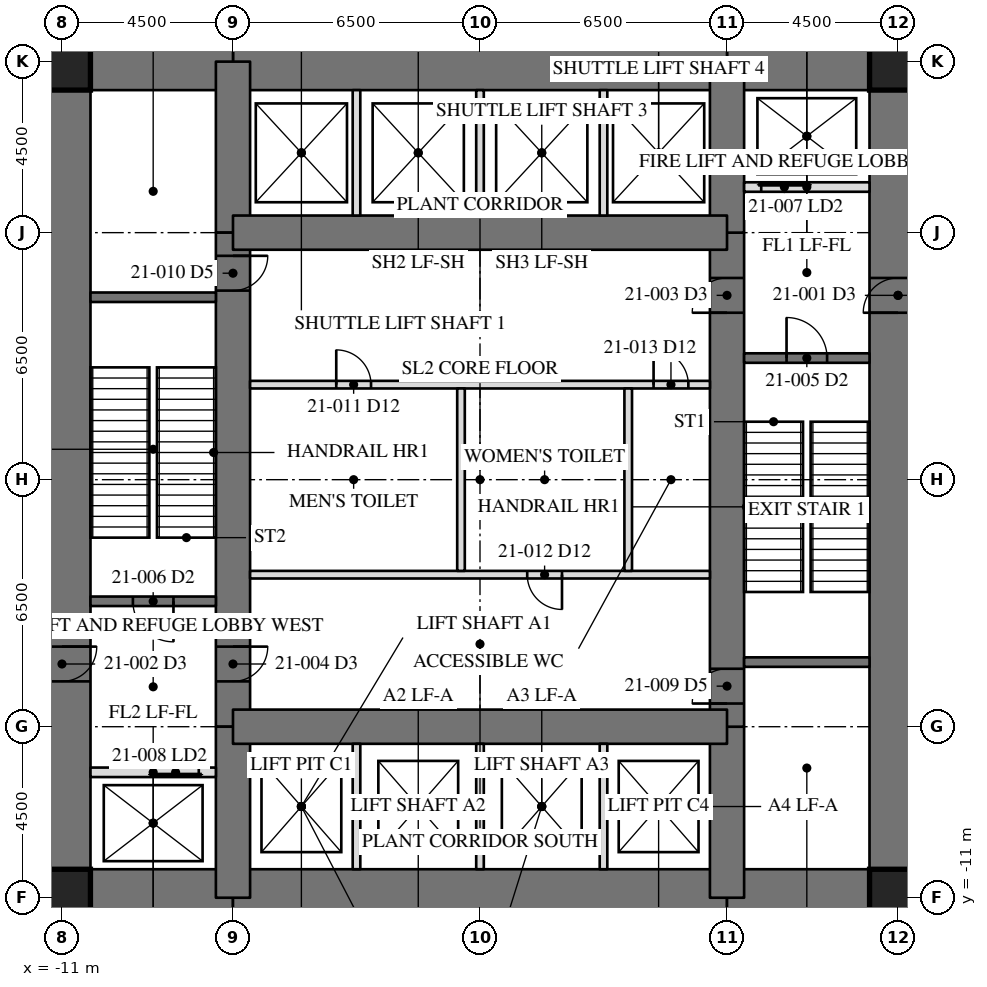
"""IFC4 building model, lengths in metres.
Left out: names, types, materials, properties, quantities, classifications, styles, units other than length and angle.
Written with IfcOpenShell. Run it as: python <this file> out.ifc"""

import sys

from ifc_helpers import new_model, si_unit, direction, frame, frame_2d, origin, origin_2d, place, context, subcontext, project, spatial, rectangle, hollow_rectangle, extrude, element, fill, save


model = new_model("IFC4")
c1 = context("Model", 3, precision=1e-05, world=origin(), true_north=direction((0.0, 1.0)))
c2 = subcontext(c1, "Body", "Model", "MODEL_VIEW")
j1 = project(units=[si_unit("LENGTHUNIT", "METRE"), si_unit("PLANEANGLEUNIT", "RADIAN")], contexts=[c1])
p1 = place(None, origin())
s1 = spatial("IfcSite", under=j1, at=p1, CompositionType="ELEMENT")
p2 = place(p1, origin())
s2 = spatial("IfcBuilding", under=s1, at=p2, CompositionType="ELEMENT")
p3 = place(p2, frame((0.0, 0.0, 89.8)))
s3 = spatial("IfcBuildingStorey", under=s2, at=p3, CompositionType="ELEMENT", Elevation=89.8)
p4 = place(p3, frame((11.0, -11.0, 0.0), z_axis=(0.0, 0.0, 1.0), x_axis=(0.0, 1.0, 0.0)))
e1 = element("IfcWall", 1, at=p4, inside=s3, PredefinedType="SHEAR", context=c2, shape_type="SweptSolid", body=[
    extrude(rectangle(XDim=22.0, YDim=1.5, at=frame_2d((11.0, 0.0))), origin(), (0.0, 0.0, 1.0), 6.0),
])
p5 = place(p4, frame((15.393, 0.0, 0.0)))
e2 = element("IfcOpeningElement", 2, at=p5, cuts=e1, PredefinedType="OPENING", context=c2, shape_type="SweptSolid", body=[
    extrude(rectangle(XDim=0.915, YDim=2.134, at=frame_2d((0.458, 1.067))), frame((0.0, 0.76, 0.0), z_axis=(0.0, -1.0, 0.0), x_axis=(1.0, 0.0, 0.0)), (0.0, 0.0, 1.0), 1.52),
])
p6 = place(p3, frame((-11.0, 11.0, 0.0), z_axis=(0.0, 0.0, 1.0), x_axis=(0.0, -1.0, 0.0)))
e3 = element("IfcWall", 3, at=p6, inside=s3, PredefinedType="SHEAR", context=c2, shape_type="SweptSolid", body=[
    extrude(rectangle(XDim=22.0, YDim=1.5, at=frame_2d((11.0, 0.0))), origin(), (0.0, 0.0, 1.0), 6.0),
])
p7 = place(p6, frame((15.393, 0.0, 0.0)))
e4 = element("IfcOpeningElement", 4, at=p7, cuts=e3, PredefinedType="OPENING", context=c2, shape_type="SweptSolid", body=[
    extrude(rectangle(XDim=0.915, YDim=2.134, at=frame_2d((0.458, 1.067))), frame((0.0, 0.76, 0.0), z_axis=(0.0, -1.0, 0.0), x_axis=(1.0, 0.0, 0.0)), (0.0, 0.0, 1.0), 1.52),
])
p8 = place(p3, frame((11.0, 11.0, 0.0), z_axis=(0.0, 0.0, 1.0), x_axis=(-1.0, 0.0, 0.0)))
e5 = element("IfcWall", 5, at=p8, inside=s3, PredefinedType="SHEAR", context=c2, shape_type="SweptSolid", body=[
    extrude(rectangle(XDim=4.5, YDim=1.5, at=frame_2d((2.25, 0.0))), origin(), (0.0, 0.0, 1.0), 6.0),
])
p9 = place(p3, frame((6.5, 11.0, 0.0), z_axis=(0.0, 0.0, 1.0), x_axis=(-1.0, 0.0, 0.0)))
e6 = element("IfcWall", 6, at=p9, inside=s3, PredefinedType="SHEAR", context=c2, shape_type="SweptSolid", body=[
    extrude(rectangle(XDim=13.0, YDim=1.5, at=frame_2d((6.5, 0.0))), origin(), (0.0, 0.0, 1.0), 6.0),
])
for number, where, z_axis, x_axis in (
    (7, (-6.5, 11.0, 0.0), (0.0, 0.0, 1.0), (-1.0, 0.0, 0.0)),
    (8, (-11.0, -11.0, 0.0), (0.0, 0.0, 1.0), (1.0, 0.0, 0.0)),
):
    element("IfcWall", number, at=place(p3, frame(where, z_axis=z_axis, x_axis=x_axis)), inside=s3, PredefinedType="SHEAR", context=c2, shape_type="SweptSolid", body=[
        extrude(rectangle(XDim=4.5, YDim=1.5, at=frame_2d((2.25, 0.0))), origin(), (0.0, 0.0, 1.0), 6.0),
    ])
p10 = place(p3, frame((-6.5, -11.0, 0.0), z_axis=(0.0, 0.0, 1.0), x_axis=(1.0, 0.0, 0.0)))
e9 = element("IfcWall", 9, at=p10, inside=s3, PredefinedType="SHEAR", context=c2, shape_type="SweptSolid", body=[
    extrude(rectangle(XDim=13.0, YDim=1.5, at=frame_2d((6.5, 0.0))), origin(), (0.0, 0.0, 1.0), 6.0),
])
p11 = place(p3, frame((6.5, -11.0, 0.0), z_axis=(0.0, 0.0, 1.0), x_axis=(1.0, 0.0, 0.0)))
e10 = element("IfcWall", 10, at=p11, inside=s3, PredefinedType="SHEAR", context=c2, shape_type="SweptSolid", body=[
    extrude(rectangle(XDim=4.5, YDim=1.5, at=frame_2d((2.25, 0.0))), origin(), (0.0, 0.0, 1.0), 6.0),
])
p12 = place(p3, frame((6.5, -11.0, 0.0), z_axis=(0.0, 0.0, 1.0), x_axis=(0.0, 1.0, 0.0)))
e11 = element("IfcWall", 11, at=p12, inside=s3, PredefinedType="SHEAR", context=c2, shape_type="SweptSolid", body=[
    extrude(rectangle(XDim=4.5, YDim=0.9, at=frame_2d((2.25, 0.0))), origin(), (0.0, 0.0, 1.0), 6.0),
])
p13 = place(p3, frame((6.5, -6.5, 0.0), z_axis=(0.0, 0.0, 1.0), x_axis=(0.0, 1.0, 0.0)))
e12 = element("IfcWall", 12, at=p13, inside=s3, PredefinedType="SHEAR", context=c2, shape_type="SweptSolid", body=[
    extrude(rectangle(XDim=13.0, YDim=0.9, at=frame_2d((6.5, 0.0))), origin(), (0.0, 0.0, 1.0), 6.0),
])
p14 = place(p13, frame((10.893, 0.0, 0.0)))
e13 = element("IfcOpeningElement", 13, at=p14, cuts=e12, PredefinedType="OPENING", context=c2, shape_type="SweptSolid", body=[
    extrude(rectangle(XDim=0.915, YDim=2.134, at=frame_2d((0.458, 1.067))), frame((0.0, 0.46, 0.0), z_axis=(0.0, -1.0, 0.0), x_axis=(1.0, 0.0, 0.0)), (0.0, 0.0, 1.0), 0.92),
])
p15 = place(p13, frame((0.61, 0.0, 0.0)))
e14 = element("IfcOpeningElement", 14, at=p15, cuts=e12, PredefinedType="OPENING", context=c2, shape_type="SweptSolid", body=[
    extrude(rectangle(XDim=0.915, YDim=2.134, at=frame_2d((0.458, 1.067))), frame((0.0, 0.46, 0.0), z_axis=(0.0, -1.0, 0.0), x_axis=(1.0, 0.0, 0.0)), (0.0, 0.0, 1.0), 0.92),
])
for number, where, z_axis, x_axis in (
    (15, (6.5, 6.5, 0.0), (0.0, 0.0, 1.0), (0.0, 1.0, 0.0)),
    (16, (-6.5, 11.0, 0.0), (0.0, 0.0, 1.0), (0.0, -1.0, 0.0)),
):
    element("IfcWall", number, at=place(p3, frame(where, z_axis=z_axis, x_axis=x_axis)), inside=s3, PredefinedType="SHEAR", context=c2, shape_type="SweptSolid", body=[
        extrude(rectangle(XDim=4.5, YDim=0.9, at=frame_2d((2.25, 0.0))), origin(), (0.0, 0.0, 1.0), 6.0),
    ])
p16 = place(p3, frame((-6.5, 6.5, 0.0), z_axis=(0.0, 0.0, 1.0), x_axis=(0.0, -1.0, 0.0)))
e17 = element("IfcWall", 17, at=p16, inside=s3, PredefinedType="SHEAR", context=c2, shape_type="SweptSolid", body=[
    extrude(rectangle(XDim=13.0, YDim=0.9, at=frame_2d((6.5, 0.0))), origin(), (0.0, 0.0, 1.0), 6.0),
])
p17 = place(p16, frame((10.893, 0.0, 0.0)))
e18 = element("IfcOpeningElement", 18, at=p17, cuts=e17, PredefinedType="OPENING", context=c2, shape_type="SweptSolid", body=[
    extrude(rectangle(XDim=0.915, YDim=2.134, at=frame_2d((0.458, 1.067))), frame((0.0, 0.46, 0.0), z_axis=(0.0, -1.0, 0.0), x_axis=(1.0, 0.0, 0.0)), (0.0, 0.0, 1.0), 0.92),
])
p18 = place(p16, frame((0.61, 0.0, 0.0)))
e19 = element("IfcOpeningElement", 19, at=p18, cuts=e17, PredefinedType="OPENING", context=c2, shape_type="SweptSolid", body=[
    extrude(rectangle(XDim=0.915, YDim=2.134, at=frame_2d((0.458, 1.067))), frame((0.0, 0.46, 0.0), z_axis=(0.0, -1.0, 0.0), x_axis=(1.0, 0.0, 0.0)), (0.0, 0.0, 1.0), 0.92),
])
p19 = place(p3, frame((-6.5, -6.5, 0.0), z_axis=(0.0, 0.0, 1.0), x_axis=(0.0, -1.0, 0.0)))
e20 = element("IfcWall", 20, at=p19, inside=s3, PredefinedType="SHEAR", context=c2, shape_type="SweptSolid", body=[
    extrude(rectangle(XDim=4.5, YDim=0.9, at=frame_2d((2.25, 0.0))), origin(), (0.0, 0.0, 1.0), 6.0),
])
for number, where, z_axis, x_axis in (
    (21, (6.5, 6.5, 0.0), (0.0, 0.0, 1.0), (-1.0, 0.0, 0.0)),
    (22, (-6.5, -6.5, 0.0), (0.0, 0.0, 1.0), (1.0, 0.0, 0.0)),
):
    element("IfcWall", number, at=place(p3, frame(where, z_axis=z_axis, x_axis=x_axis)), inside=s3, PredefinedType="SHEAR", context=c2, shape_type="SweptSolid", body=[
        extrude(rectangle(XDim=13.0, YDim=0.9, at=frame_2d((6.5, 0.0))), origin(), (0.0, 0.0, 1.0), 6.0),
    ])
for number, where, z_axis, x_axis in (
    (23, (11.0, 11.0, 0.0), (0.0, 0.0, 1.0), (1.0, 0.0, 0.0)),
    (24, (-11.0, 11.0, 0.0), (0.0, 0.0, 1.0), (1.0, 0.0, 0.0)),
    (25, (-11.0, -11.0, 0.0), (0.0, 0.0, 1.0), (1.0, 0.0, 0.0)),
    (26, (11.0, -11.0, 0.0), (0.0, 0.0, 1.0), (1.0, 0.0, 0.0)),
):
    element("IfcColumn", number, at=place(p3, frame(where, z_axis=z_axis, x_axis=x_axis)), inside=s3, PredefinedType="COLUMN", context=c2, shape_type="SweptSolid", body=[
        extrude(hollow_rectangle(XDim=1.499, YDim=1.499, WallThickness=0.102, at=origin_2d()), origin(), (0.0, 0.0, 1.0), 6.0),
    ])
for number, where, z_axis, x_axis in (
    (27, (6.95, -4.8, 0.0), (0.0, 0.0, 1.0), (1.0, 0.0, 0.0)),
    (28, (-6.95, 4.8, 0.0), (0.0, 0.0, 1.0), (-1.0, 0.0, 0.0)),
):
    element("IfcWall", number, at=place(p3, frame(where, z_axis=z_axis, x_axis=x_axis)), inside=s3, PredefinedType="SOLIDWALL", context=c2, shape_type="SweptSolid", body=[
        extrude(rectangle(XDim=3.3, YDim=0.25, at=frame_2d((1.65, 0.0))), origin(), (0.0, 0.0, 1.0), 5.81),
    ])
p20 = place(p3, frame((6.95, 3.2, 0.0), z_axis=(0.0, 0.0, 1.0), x_axis=(1.0, 0.0, 0.0)))
e29 = element("IfcWall", 29, at=p20, inside=s3, PredefinedType="SOLIDWALL", context=c2, shape_type="SweptSolid", body=[
    extrude(rectangle(XDim=3.3, YDim=0.25, at=frame_2d((1.65, 0.0))), origin(), (0.0, 0.0, 1.0), 5.81),
])
p21 = place(p20, frame((1.116, 0.0, 0.0)))
e30 = element("IfcOpeningElement", 30, at=p21, cuts=e29, PredefinedType="OPENING", context=c2, shape_type="SweptSolid", body=[
    extrude(rectangle(XDim=1.067, YDim=2.134, at=frame_2d((0.533, 1.067))), frame((0.0, 0.135, 0.0), z_axis=(0.0, -1.0, 0.0), x_axis=(1.0, 0.0, 0.0)), (0.0, 0.0, 1.0), 0.27),
])
p22 = place(p3, frame((-6.95, -3.2, 0.0), z_axis=(0.0, 0.0, 1.0), x_axis=(-1.0, 0.0, 0.0)))
e31 = element("IfcWall", 31, at=p22, inside=s3, PredefinedType="SOLIDWALL", context=c2, shape_type="SweptSolid", body=[
    extrude(rectangle(XDim=3.3, YDim=0.25, at=frame_2d((1.65, 0.0))), origin(), (0.0, 0.0, 1.0), 5.81),
])
p23 = place(p22, frame((1.116, 0.0, 0.0)))
e32 = element("IfcOpeningElement", 32, at=p23, cuts=e31, PredefinedType="OPENING", context=c2, shape_type="SweptSolid", body=[
    extrude(rectangle(XDim=1.067, YDim=2.134, at=frame_2d((0.533, 1.067))), frame((0.0, 0.135, 0.0), z_axis=(0.0, -1.0, 0.0), x_axis=(1.0, 0.0, 0.0)), (0.0, 0.0, 1.0), 0.27),
])
p24 = place(p3, frame((6.95, 7.7, 0.0), z_axis=(0.0, 0.0, 1.0), x_axis=(1.0, 0.0, 0.0)))
e33 = element("IfcWall", 33, at=p24, inside=s3, PredefinedType="PARTITIONING", context=c2, shape_type="SweptSolid", body=[
    extrude(rectangle(XDim=3.3, YDim=0.25, at=frame_2d((1.65, 0.0))), origin(), (0.0, 0.0, 1.0), 5.81),
])
p25 = place(p24, frame((0.45, 0.0, 0.0)))
e34 = element("IfcOpeningElement", 34, at=p25, cuts=e33, PredefinedType="OPENING", context=c2, shape_type="SweptSolid", body=[
    extrude(rectangle(XDim=1.219, YDim=2.134, at=frame_2d((0.609, 1.067))), frame((0.0, 0.135, 0.0), z_axis=(0.0, -1.0, 0.0), x_axis=(1.0, 0.0, 0.0)), (0.0, 0.0, 1.0), 0.27),
])
p26 = place(p3, frame((-6.95, -7.7, 0.0), z_axis=(0.0, 0.0, 1.0), x_axis=(-1.0, 0.0, 0.0)))
e35 = element("IfcWall", 35, at=p26, inside=s3, PredefinedType="PARTITIONING", context=c2, shape_type="SweptSolid", body=[
    extrude(rectangle(XDim=3.3, YDim=0.25, at=frame_2d((1.65, 0.0))), origin(), (0.0, 0.0, 1.0), 5.81),
])
p27 = place(p26, frame((0.45, 0.0, 0.0)))
e36 = element("IfcOpeningElement", 36, at=p27, cuts=e35, PredefinedType="OPENING", context=c2, shape_type="SweptSolid", body=[
    extrude(rectangle(XDim=1.219, YDim=2.134, at=frame_2d((0.609, 1.067))), frame((0.0, 0.135, 0.0), z_axis=(0.0, -1.0, 0.0), x_axis=(1.0, 0.0, 0.0)), (0.0, 0.0, 1.0), 0.27),
])
p28 = place(p3, frame((-6.05, 2.5, 0.0), z_axis=(0.0, 0.0, 1.0), x_axis=(1.0, 0.0, 0.0)))
e37 = element("IfcWall", 37, at=p28, inside=s3, PredefinedType="PARTITIONING", context=c2, shape_type="SweptSolid", body=[
    extrude(rectangle(XDim=12.1, YDim=0.2, at=frame_2d((6.05, 0.0))), origin(), (0.0, 0.0, 1.0), 5.81),
])
p29 = place(p28, frame((2.268, 0.0, 0.0)))
e38 = element("IfcOpeningElement", 38, at=p29, cuts=e37, PredefinedType="OPENING", context=c2, shape_type="SweptSolid", body=[
    extrude(rectangle(XDim=0.915, YDim=2.134, at=frame_2d((0.458, 1.067))), frame((0.0, 0.11, 0.0), z_axis=(0.0, -1.0, 0.0), x_axis=(1.0, 0.0, 0.0)), (0.0, 0.0, 1.0), 0.22),
])
p30 = place(p28, frame((10.617, 0.0, 0.0)))
e39 = element("IfcOpeningElement", 39, at=p30, cuts=e37, PredefinedType="OPENING", context=c2, shape_type="SweptSolid", body=[
    extrude(rectangle(XDim=0.915, YDim=2.134, at=frame_2d((0.458, 1.067))), frame((0.0, 0.11, 0.0), z_axis=(0.0, -1.0, 0.0), x_axis=(1.0, 0.0, 0.0)), (0.0, 0.0, 1.0), 0.22),
])
p31 = place(p3, frame((6.05, -2.5, 0.0), z_axis=(0.0, 0.0, 1.0), x_axis=(-1.0, 0.0, 0.0)))
e40 = element("IfcWall", 40, at=p31, inside=s3, PredefinedType="PARTITIONING", context=c2, shape_type="SweptSolid", body=[
    extrude(rectangle(XDim=12.1, YDim=0.2, at=frame_2d((6.05, 0.0))), origin(), (0.0, 0.0, 1.0), 5.81),
])
p32 = place(p31, frame((3.893, 0.0, 0.0)))
e41 = element("IfcOpeningElement", 41, at=p32, cuts=e40, PredefinedType="OPENING", context=c2, shape_type="SweptSolid", body=[
    extrude(rectangle(XDim=0.915, YDim=2.134, at=frame_2d((0.458, 1.067))), frame((0.0, 0.11, 0.0), z_axis=(0.0, -1.0, 0.0), x_axis=(1.0, 0.0, 0.0)), (0.0, 0.0, 1.0), 0.22),
])
for number, where, z_axis, x_axis in (
    (42, (-3.25, 6.95, 0.0), (0.0, 0.0, 1.0), (0.0, 1.0, 0.0)),
    (43, (0.0, 6.95, 0.0), (0.0, 0.0, 1.0), (0.0, 1.0, 0.0)),
    (44, (3.25, 6.95, 0.0), (0.0, 0.0, 1.0), (0.0, 1.0, 0.0)),
    (45, (-3.25, -10.25, 0.0), (0.0, 0.0, 1.0), (0.0, 1.0, 0.0)),
    (46, (0.0, -10.25, 0.0), (0.0, 0.0, 1.0), (0.0, 1.0, 0.0)),
    (47, (3.25, -10.25, 0.0), (0.0, 0.0, 1.0), (0.0, 1.0, 0.0)),
):
    element("IfcWall", number, at=place(p3, frame(where, z_axis=z_axis, x_axis=x_axis)), inside=s3, PredefinedType="PARTITIONING", context=c2, shape_type="SweptSolid", body=[
        extrude(rectangle(XDim=3.3, YDim=0.2, at=frame_2d((1.65, 0.0))), origin(), (0.0, 0.0, 1.0), 5.81),
    ])
for number, where, z_axis, x_axis in (
    (48, (-0.5, -2.4, 0.0), (0.0, 0.0, 1.0), (0.0, 1.0, 0.0)),
    (49, (3.9, -2.4, 0.0), (0.0, 0.0, 1.0), (0.0, 1.0, 0.0)),
):
    element("IfcWall", number, at=place(p3, frame(where, z_axis=z_axis, x_axis=x_axis)), inside=s3, PredefinedType="PARTITIONING", context=c2, shape_type="SweptSolid", body=[
        extrude(rectangle(XDim=4.8, YDim=0.2, at=frame_2d((2.4, 0.0))), origin(), (0.0, 0.0, 1.0), 5.81),
    ])
p33 = place(p14, origin())
e50 = element("IfcDoor", 50, at=p33, inside=s3, OperationType="SINGLE_SWING_RIGHT", PredefinedType="DOOR", context=c2, shape_type="SweptSolid", body=[
    extrude(rectangle(XDim=0.915, YDim=2.134, at=frame_2d((0.458, 1.067))), frame((0.0, -0.375, 0.0), z_axis=(0.0, -1.0, 0.0), x_axis=(1.0, 0.0, 0.0)), (0.0, 0.0, 1.0), 0.05),
])
fill(e13, e50)
p34 = place(p17, origin())
e51 = element("IfcDoor", 51, at=p34, inside=s3, OperationType="SINGLE_SWING_RIGHT", PredefinedType="DOOR", context=c2, shape_type="SweptSolid", body=[
    extrude(rectangle(XDim=0.915, YDim=2.134, at=frame_2d((0.458, 1.067))), frame((0.0, -0.375, 0.0), z_axis=(0.0, -1.0, 0.0), x_axis=(1.0, 0.0, 0.0)), (0.0, 0.0, 1.0), 0.05),
])
fill(e18, e51)
p35 = place(p21, origin())
e52 = element("IfcDoor", 52, at=p35, inside=s3, OperationType="SINGLE_SWING_LEFT", PredefinedType="DOOR", context=c2, shape_type="SweptSolid", body=[
    extrude(rectangle(XDim=1.067, YDim=2.134, at=frame_2d((0.533, 1.067))), frame((0.0, 0.025, 0.0), z_axis=(0.0, -1.0, 0.0), x_axis=(1.0, 0.0, 0.0)), (0.0, 0.0, 1.0), 0.05),
])
fill(e30, e52)
p36 = place(p23, origin())
e53 = element("IfcDoor", 53, at=p36, inside=s3, OperationType="SINGLE_SWING_LEFT", PredefinedType="DOOR", context=c2, shape_type="SweptSolid", body=[
    extrude(rectangle(XDim=1.067, YDim=2.134, at=frame_2d((0.533, 1.067))), frame((0.0, 0.025, 0.0), z_axis=(0.0, -1.0, 0.0), x_axis=(1.0, 0.0, 0.0)), (0.0, 0.0, 1.0), 0.05),
])
fill(e32, e53)
p37 = place(p25, origin())
e54 = element("IfcDoor", 54, at=p37, inside=s3, OperationType="SLIDING_TO_LEFT", PredefinedType="DOOR", context=c2, shape_type="SweptSolid", body=[
    extrude(rectangle(XDim=1.219, YDim=2.134, at=frame_2d((0.609, 1.067))), frame((0.0, 0.025, 0.0), z_axis=(0.0, -1.0, 0.0), x_axis=(1.0, 0.0, 0.0)), (0.0, 0.0, 1.0), 0.05),
])
fill(e34, e54)
p38 = place(p27, origin())
e55 = element("IfcDoor", 55, at=p38, inside=s3, OperationType="SLIDING_TO_LEFT", PredefinedType="DOOR", context=c2, shape_type="SweptSolid", body=[
    extrude(rectangle(XDim=1.219, YDim=2.134, at=frame_2d((0.609, 1.067))), frame((0.0, 0.025, 0.0), z_axis=(0.0, -1.0, 0.0), x_axis=(1.0, 0.0, 0.0)), (0.0, 0.0, 1.0), 0.05),
])
fill(e36, e55)
p39 = place(p15, origin())
e56 = element("IfcDoor", 56, at=p39, inside=s3, OperationType="SINGLE_SWING_RIGHT", PredefinedType="DOOR", context=c2, shape_type="SweptSolid", body=[
    extrude(rectangle(XDim=0.915, YDim=2.134, at=frame_2d((0.458, 1.067))), frame((0.0, -0.375, 0.0), z_axis=(0.0, -1.0, 0.0), x_axis=(1.0, 0.0, 0.0)), (0.0, 0.0, 1.0), 0.05),
])
fill(e14, e56)
p40 = place(p18, origin())
e57 = element("IfcDoor", 57, at=p40, inside=s3, OperationType="SINGLE_SWING_RIGHT", PredefinedType="DOOR", context=c2, shape_type="SweptSolid", body=[
    extrude(rectangle(XDim=0.915, YDim=2.134, at=frame_2d((0.458, 1.067))), frame((0.0, -0.375, 0.0), z_axis=(0.0, -1.0, 0.0), x_axis=(1.0, 0.0, 0.0)), (0.0, 0.0, 1.0), 0.05),
])
fill(e19, e57)
p41 = place(p29, origin())
e58 = element("IfcDoor", 58, at=p41, inside=s3, OperationType="SINGLE_SWING_LEFT", PredefinedType="DOOR", context=c2, shape_type="SweptSolid", body=[
    extrude(rectangle(XDim=0.915, YDim=2.134, at=frame_2d((0.458, 1.067))), frame((0.0, 0.025, 0.0), z_axis=(0.0, -1.0, 0.0), x_axis=(1.0, 0.0, 0.0)), (0.0, 0.0, 1.0), 0.05),
])
fill(e38, e58)
p42 = place(p32, origin())
e59 = element("IfcDoor", 59, at=p42, inside=s3, OperationType="SINGLE_SWING_LEFT", PredefinedType="DOOR", context=c2, shape_type="SweptSolid", body=[
    extrude(rectangle(XDim=0.915, YDim=2.134, at=frame_2d((0.458, 1.067))), frame((0.0, 0.025, 0.0), z_axis=(0.0, -1.0, 0.0), x_axis=(1.0, 0.0, 0.0)), (0.0, 0.0, 1.0), 0.05),
])
fill(e41, e59)
p43 = place(p30, origin())
e60 = element("IfcDoor", 60, at=p43, inside=s3, OperationType="SINGLE_SWING_LEFT", PredefinedType="DOOR", context=c2, shape_type="SweptSolid", body=[
    extrude(rectangle(XDim=0.915, YDim=2.134, at=frame_2d((0.458, 1.067))), frame((0.0, 0.025, 0.0), z_axis=(0.0, -1.0, 0.0), x_axis=(1.0, 0.0, 0.0)), (0.0, 0.0, 1.0), 0.05),
])
fill(e39, e60)
save(model, sys.argv[1])
